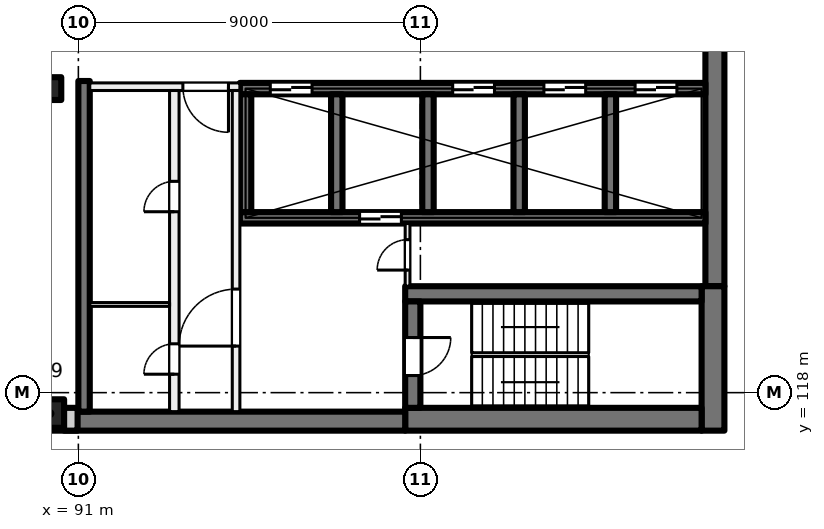
"""IFC4 building model, lengths in metres.
Left out: names, types, materials, properties, quantities, classifications, styles, units other than length and angle.
Written with IfcOpenShell. Run it as: python <this file> out.ifc"""

import sys

from ifc_helpers import new_model, si_unit, direction, frame, frame_2d, origin, origin_2d, place, context, subcontext, project, spatial, rectangle, extrude, element, fill, save


model = new_model("IFC4")
c1 = context("Model", 3, precision=1e-05, world=origin(), true_north=direction((0.0, 1.0)))
c2 = subcontext(c1, "Body", "Model", "MODEL_VIEW")
j1 = project(units=[si_unit("LENGTHUNIT", "METRE"), si_unit("PLANEANGLEUNIT", "RADIAN")], contexts=[c1])
p1 = place(None, origin())
s1 = spatial("IfcSite", under=j1, at=p1, CompositionType="ELEMENT")
p2 = place(p1, origin())
s2 = spatial("IfcBuilding", under=s1, at=p2, CompositionType="ELEMENT")
p3 = place(p2, frame((0.0, 0.0, 192.0)))
s3 = spatial("IfcBuildingStorey", under=s2, at=p3, CompositionType="ELEMENT", Elevation=192.0)
p4 = place(p3, frame((90.25, 126.0, 0.0), z_axis=(0.0, 0.0, 1.0), x_axis=(1.0, 0.0, 0.0)))
e1 = element("IfcColumn", 1, at=p4, inside=s3, PredefinedType="COLUMN", context=c2, shape_type="SweptSolid", body=[
    extrude(rectangle(XDim=0.6, YDim=0.6, at=origin_2d()), origin(), (0.0, 0.0, 1.0), 4.0),
])
p5 = place(p3, frame((90.25, 117.45, 0.0), z_axis=(0.0, 0.0, 1.0), x_axis=(1.0, 0.0, 0.0)))
e2 = element("IfcColumn", 2, at=p5, inside=s3, PredefinedType="COLUMN", context=c2, shape_type="SweptSolid", body=[
    extrude(rectangle(XDim=0.75, YDim=0.75, at=origin_2d()), origin(), (0.0, 0.0, 1.0), 4.0),
])
p6 = place(p3, frame((107.75, 135.2, 0.0), z_axis=(0.0, 0.0, 1.0), x_axis=(0.0, -1.0, 0.0)))
e3 = element("IfcWall", 3, at=p6, inside=s3, PredefinedType="SHEAR", context=c2, shape_type="SweptSolid", body=[
    extrude(rectangle(XDim=14.4, YDim=0.5, at=frame_2d((7.2, 0.0))), origin(), (0.0, 0.0, 1.0), 4.0),
])
p7 = place(p3, frame((107.7, 120.8, 0.0), z_axis=(0.0, 0.0, 1.0), x_axis=(0.0, -1.0, 0.0)))
e4 = element("IfcWall", 4, at=p7, inside=s3, PredefinedType="SHEAR", context=c2, shape_type="SweptSolid", body=[
    extrude(rectangle(XDim=3.8, YDim=0.6, at=frame_2d((1.9, 0.0))), origin(), (0.0, 0.0, 1.0), 4.0),
])
p8 = place(p3, frame((107.4, 117.3, 0.0), z_axis=(0.0, 0.0, 1.0), x_axis=(-1.0, 0.0, 0.0)))
e5 = element("IfcWall", 5, at=p8, inside=s3, PredefinedType="SHEAR", context=c2, shape_type="SweptSolid", body=[
    extrude(rectangle(XDim=7.8, YDim=0.6, at=frame_2d((3.9, 0.0))), origin(), (0.0, 0.0, 1.0), 4.0),
])
p9 = place(p3, frame((99.6, 117.25, 0.0), z_axis=(0.0, 0.0, 1.0), x_axis=(-1.0, 0.0, 0.0)))
e6 = element("IfcWall", 6, at=p9, inside=s3, PredefinedType="SHEAR", context=c2, shape_type="SweptSolid", body=[
    extrude(rectangle(XDim=8.975, YDim=0.5, at=frame_2d((4.488, 0.0))), origin(), (0.0, 0.0, 1.0), 4.0),
])
p10 = place(p3, frame((107.4, 120.6, 0.0), z_axis=(0.0, 0.0, 1.0), x_axis=(-1.0, 0.0, 0.0)))
e7 = element("IfcWall", 7, at=p10, inside=s3, PredefinedType="SHEAR", context=c2, shape_type="SweptSolid", body=[
    extrude(rectangle(XDim=7.8, YDim=0.4, at=frame_2d((3.9, 0.0))), origin(), (0.0, 0.0, 1.0), 4.0),
])
p11 = place(p3, frame((99.8, 120.4, 0.0), z_axis=(0.0, 0.0, 1.0), x_axis=(0.0, -1.0, 0.0)))
e8 = element("IfcWall", 8, at=p11, inside=s3, PredefinedType="SHEAR", context=c2, shape_type="SweptSolid", body=[
    extrude(rectangle(XDim=2.8, YDim=0.4, at=frame_2d((1.4, 0.0))), origin(), (0.0, 0.0, 1.0), 4.0),
])
p12 = place(p11, frame((0.95, 0.0, 0.0)))
e9 = element("IfcOpeningElement", 9, at=p12, cuts=e8, PredefinedType="OPENING", context=c2, shape_type="SweptSolid", body=[
    extrude(rectangle(XDim=1.0, YDim=2.1, at=frame_2d((0.5, 1.05))), frame((0.0, 0.21, 0.0), z_axis=(0.0, -1.0, 0.0), x_axis=(1.0, 0.0, 0.0)), (0.0, 0.0, 1.0), 0.42),
])
p13 = place(p3, frame((107.5, 126.0, 0.0), z_axis=(0.0, 0.0, 1.0), x_axis=(-1.0, 0.0, 0.0)))
e10 = element("IfcWall", 10, at=p13, inside=s3, PredefinedType="SHEAR", context=c2, shape_type="SweptSolid", body=[
    extrude(rectangle(XDim=12.25, YDim=0.3, at=frame_2d((6.125, 0.0))), origin(), (0.0, 0.0, 1.0), 4.0),
])
p14 = place(p13, frame((0.75, 0.0, 0.0)))
e11 = element("IfcOpeningElement", 11, at=p14, cuts=e10, PredefinedType="OPENING", context=c2, shape_type="SweptSolid", body=[
    extrude(rectangle(XDim=1.1, YDim=2.1, at=frame_2d((0.55, 1.05))), frame((0.0, 0.16, 0.0), z_axis=(0.0, -1.0, 0.0), x_axis=(1.0, 0.0, 0.0)), (0.0, 0.0, 1.0), 0.32),
])
p15 = place(p13, frame((3.15, 0.0, 0.0)))
e12 = element("IfcOpeningElement", 12, at=p15, cuts=e10, PredefinedType="OPENING", context=c2, shape_type="SweptSolid", body=[
    extrude(rectangle(XDim=1.1, YDim=2.1, at=frame_2d((0.55, 1.05))), frame((0.0, 0.16, 0.0), z_axis=(0.0, -1.0, 0.0), x_axis=(1.0, 0.0, 0.0)), (0.0, 0.0, 1.0), 0.32),
])
p16 = place(p13, frame((5.55, 0.0, 0.0)))
e13 = element("IfcOpeningElement", 13, at=p16, cuts=e10, PredefinedType="OPENING", context=c2, shape_type="SweptSolid", body=[
    extrude(rectangle(XDim=1.1, YDim=2.1, at=frame_2d((0.55, 1.05))), frame((0.0, 0.16, 0.0), z_axis=(0.0, -1.0, 0.0), x_axis=(1.0, 0.0, 0.0)), (0.0, 0.0, 1.0), 0.32),
])
p17 = place(p13, frame((10.35, 0.0, 0.0)))
e14 = element("IfcOpeningElement", 14, at=p17, cuts=e10, PredefinedType="OPENING", context=c2, shape_type="SweptSolid", body=[
    extrude(rectangle(XDim=1.1, YDim=2.1, at=frame_2d((0.55, 1.05))), frame((0.0, 0.16, 0.0), z_axis=(0.0, -1.0, 0.0), x_axis=(1.0, 0.0, 0.0)), (0.0, 0.0, 1.0), 0.32),
])
p18 = place(p3, frame((107.5, 122.6, 0.0), z_axis=(0.0, 0.0, 1.0), x_axis=(-1.0, 0.0, 0.0)))
e15 = element("IfcWall", 15, at=p18, inside=s3, PredefinedType="SHEAR", context=c2, shape_type="SweptSolid", body=[
    extrude(rectangle(XDim=12.25, YDim=0.3, at=frame_2d((6.125, 0.0))), origin(), (0.0, 0.0, 1.0), 4.0),
])
p19 = place(p18, frame((8.0, 0.0, 0.0)))
e16 = element("IfcOpeningElement", 16, at=p19, cuts=e15, PredefinedType="OPENING", context=c2, shape_type="SweptSolid", body=[
    extrude(rectangle(XDim=1.1, YDim=2.1, at=frame_2d((0.55, 1.05))), frame((0.0, 0.16, 0.0), z_axis=(0.0, -1.0, 0.0), x_axis=(1.0, 0.0, 0.0)), (0.0, 0.0, 1.0), 0.32),
])
for number, where, z_axis, x_axis in (
    (17, (105.0, 125.85, 0.0), (0.0, 0.0, 1.0), (0.0, -1.0, 0.0)),
    (18, (102.6, 125.85, 0.0), (0.0, 0.0, 1.0), (0.0, -1.0, 0.0)),
    (19, (100.2, 125.85, 0.0), (0.0, 0.0, 1.0), (0.0, -1.0, 0.0)),
    (20, (97.8, 125.85, 0.0), (0.0, 0.0, 1.0), (0.0, -1.0, 0.0)),
    (21, (95.4, 125.85, 0.0), (0.0, 0.0, 1.0), (0.0, -1.0, 0.0)),
):
    element("IfcWall", number, at=place(p3, frame(where, z_axis=z_axis, x_axis=x_axis)), inside=s3, PredefinedType="SHEAR", context=c2, shape_type="SweptSolid", body=[
        extrude(rectangle(XDim=3.1, YDim=0.3, at=frame_2d((1.55, 0.0))), origin(), (0.0, 0.0, 1.0), 4.0),
    ])
p20 = place(p3, frame((91.15, 126.2, 0.0), z_axis=(0.0, 0.0, 1.0), x_axis=(0.0, -1.0, 0.0)))
e22 = element("IfcWall", 22, at=p20, inside=s3, PredefinedType="SHEAR", context=c2, shape_type="SweptSolid", body=[
    extrude(rectangle(XDim=8.7, YDim=0.3, at=frame_2d((4.35, 0.0))), origin(), (0.0, 0.0, 1.0), 4.0),
])
p21 = place(p3, frame((90.98, 117.3, 0.0), z_axis=(0.0, 0.0, 1.0), x_axis=(-1.0, 0.0, 0.0)))
e23 = element("IfcWall", 23, at=p21, inside=s3, PredefinedType="SOLIDWALL", context=c2, shape_type="SweptSolid", body=[
    extrude(rectangle(XDim=33.745, YDim=0.6, at=frame_2d((16.873, 0.0))), origin(), (0.0, 0.0, 1.0), 3.625),
])
p22 = place(p21, frame((1.48, 0.0, 0.9)))
e24 = element("IfcOpeningElement", 24, at=p22, cuts=e23, PredefinedType="OPENING", context=c2, shape_type="SweptSolid", body=[
    extrude(rectangle(XDim=3.0, YDim=2.4, at=frame_2d((1.5, 1.2))), frame((0.0, 0.31, 0.0), z_axis=(0.0, -1.0, 0.0), x_axis=(1.0, 0.0, 0.0)), (0.0, 0.0, 1.0), 0.62),
])
p23 = place(p21, frame((5.98, 0.0, 0.9)))
e25 = element("IfcOpeningElement", 25, at=p23, cuts=e23, PredefinedType="OPENING", context=c2, shape_type="SweptSolid", body=[
    extrude(rectangle(XDim=3.0, YDim=2.4, at=frame_2d((1.5, 1.2))), frame((0.0, 0.31, 0.0), z_axis=(0.0, -1.0, 0.0), x_axis=(1.0, 0.0, 0.0)), (0.0, 0.0, 1.0), 0.62),
])
p24 = place(p21, frame((10.48, 0.0, 0.9)))
e26 = element("IfcOpeningElement", 26, at=p24, cuts=e23, PredefinedType="OPENING", context=c2, shape_type="SweptSolid", body=[
    extrude(rectangle(XDim=3.0, YDim=2.4, at=frame_2d((1.5, 1.2))), frame((0.0, 0.31, 0.0), z_axis=(0.0, -1.0, 0.0), x_axis=(1.0, 0.0, 0.0)), (0.0, 0.0, 1.0), 0.62),
])
p25 = place(p21, frame((14.98, 0.0, 0.9)))
e27 = element("IfcOpeningElement", 27, at=p25, cuts=e23, PredefinedType="OPENING", context=c2, shape_type="SweptSolid", body=[
    extrude(rectangle(XDim=3.0, YDim=2.4, at=frame_2d((1.5, 1.2))), frame((0.0, 0.31, 0.0), z_axis=(0.0, -1.0, 0.0), x_axis=(1.0, 0.0, 0.0)), (0.0, 0.0, 1.0), 0.62),
])
p26 = place(p21, frame((19.48, 0.0, 0.9)))
e28 = element("IfcOpeningElement", 28, at=p26, cuts=e23, PredefinedType="OPENING", context=c2, shape_type="SweptSolid", body=[
    extrude(rectangle(XDim=3.0, YDim=2.4, at=frame_2d((1.5, 1.2))), frame((0.0, 0.31, 0.0), z_axis=(0.0, -1.0, 0.0), x_axis=(1.0, 0.0, 0.0)), (0.0, 0.0, 1.0), 0.62),
])
p27 = place(p21, frame((24.58, 0.0, 0.0)))
e29 = element("IfcOpeningElement", 29, at=p27, cuts=e23, PredefinedType="OPENING", context=c2, shape_type="SweptSolid", body=[
    extrude(rectangle(XDim=1.8, YDim=2.4, at=frame_2d((0.9, 1.2))), frame((0.0, 0.31, 0.0), z_axis=(0.0, -1.0, 0.0), x_axis=(1.0, 0.0, 0.0)), (0.0, 0.0, 1.0), 0.62),
])
p28 = place(p21, frame((28.48, 0.0, 0.9)))
e30 = element("IfcOpeningElement", 30, at=p28, cuts=e23, PredefinedType="OPENING", context=c2, shape_type="SweptSolid", body=[
    extrude(rectangle(XDim=3.0, YDim=2.4, at=frame_2d((1.5, 1.2))), frame((0.0, 0.31, 0.0), z_axis=(0.0, -1.0, 0.0), x_axis=(1.0, 0.0, 0.0)), (0.0, 0.0, 1.0), 0.62),
])
p29 = place(p3, frame((95.25, 126.05, 0.0), z_axis=(0.0, 0.0, 1.0), x_axis=(-1.0, 0.0, 0.0)))
e31 = element("IfcWall", 31, at=p29, inside=s3, PredefinedType="PARTITIONING", context=c2, shape_type="SweptSolid", body=[
    extrude(rectangle(XDim=3.95, YDim=0.2, at=frame_2d((1.975, 0.0))), origin(), (0.0, 0.0, 1.0), 3.625),
])
p30 = place(p29, frame((0.3, 0.0, 0.0)))
e32 = element("IfcOpeningElement", 32, at=p30, cuts=e31, PredefinedType="OPENING", context=c2, shape_type="SweptSolid", body=[
    extrude(rectangle(XDim=1.2, YDim=2.1, at=frame_2d((0.6, 1.05))), frame((0.0, 0.11, 0.0), z_axis=(0.0, -1.0, 0.0), x_axis=(1.0, 0.0, 0.0)), (0.0, 0.0, 1.0), 0.22),
])
p31 = place(p3, frame((95.15, 117.5, 0.0), z_axis=(0.0, 0.0, 1.0), x_axis=(0.0, 1.0, 0.0)))
e33 = element("IfcWall", 33, at=p31, inside=s3, PredefinedType="PARTITIONING", context=c2, shape_type="SweptSolid", body=[
    extrude(rectangle(XDim=8.45, YDim=0.2, at=frame_2d((4.225, 0.0))), origin(), (0.0, 0.0, 1.0), 3.625),
])
p32 = place(p31, frame((1.725, 0.0, 0.0)))
e34 = element("IfcOpeningElement", 34, at=p32, cuts=e33, PredefinedType="OPENING", context=c2, shape_type="SweptSolid", body=[
    extrude(rectangle(XDim=1.5, YDim=2.1, at=frame_2d((0.75, 1.05))), frame((0.0, 0.11, 0.0), z_axis=(0.0, -1.0, 0.0), x_axis=(1.0, 0.0, 0.0)), (0.0, 0.0, 1.0), 0.22),
])
p33 = place(p3, frame((93.525, 117.5, 0.0), z_axis=(0.0, 0.0, 1.0), x_axis=(0.0, 1.0, 0.0)))
e35 = element("IfcWall", 35, at=p33, inside=s3, PredefinedType="PARTITIONING", context=c2, shape_type="SweptSolid", body=[
    extrude(rectangle(XDim=8.45, YDim=0.25, at=frame_2d((4.225, 0.0))), origin(), (0.0, 0.0, 1.0), 3.625),
])
p34 = place(p33, frame((5.26, 0.0, 0.0)))
e36 = element("IfcOpeningElement", 36, at=p34, cuts=e35, PredefinedType="OPENING", context=c2, shape_type="SweptSolid", body=[
    extrude(rectangle(XDim=0.8, YDim=2.1, at=frame_2d((0.4, 1.05))), frame((0.0, 0.135, 0.0), z_axis=(0.0, -1.0, 0.0), x_axis=(1.0, 0.0, 0.0)), (0.0, 0.0, 1.0), 0.27),
])
p35 = place(p33, frame((0.985, 0.0, 0.0)))
e37 = element("IfcOpeningElement", 37, at=p35, cuts=e35, PredefinedType="OPENING", context=c2, shape_type="SweptSolid", body=[
    extrude(rectangle(XDim=0.8, YDim=2.1, at=frame_2d((0.4, 1.05))), frame((0.0, 0.135, 0.0), z_axis=(0.0, -1.0, 0.0), x_axis=(1.0, 0.0, 0.0)), (0.0, 0.0, 1.0), 0.27),
])
p36 = place(p3, frame((99.663, 120.8, 0.0), z_axis=(0.0, 0.0, 1.0), x_axis=(0.0, 1.0, 0.0)))
e38 = element("IfcWall", 38, at=p36, inside=s3, PredefinedType="PARTITIONING", context=c2, shape_type="SweptSolid", body=[
    extrude(rectangle(XDim=1.65, YDim=0.125, at=frame_2d((0.825, 0.0))), origin(), (0.0, 0.0, 1.0), 3.625),
])
p37 = place(p36, frame((0.425, 0.0, 0.0)))
e39 = element("IfcOpeningElement", 39, at=p37, cuts=e38, PredefinedType="OPENING", context=c2, shape_type="SweptSolid", body=[
    extrude(rectangle(XDim=0.8, YDim=2.1, at=frame_2d((0.4, 1.05))), frame((0.0, 0.073, 0.0), z_axis=(0.0, -1.0, 0.0), x_axis=(1.0, 0.0, 0.0)), (0.0, 0.0, 1.0), 0.145),
])
p38 = place(p3, frame((93.4, 120.32, 0.0), z_axis=(0.0, 0.0, 1.0), x_axis=(-1.0, 0.0, 0.0)))
e40 = element("IfcWall", 40, at=p38, inside=s3, PredefinedType="PARTITIONING", context=c2, shape_type="SweptSolid", body=[
    extrude(rectangle(XDim=2.1, YDim=0.1, at=frame_2d((1.05, 0.0))), origin(), (0.0, 0.0, 1.0), 3.625),
])
p39 = place(p14, origin())
e41 = element("IfcDoor", 41, at=p39, inside=s3, OperationType="DOUBLE_DOOR_SLIDING", PredefinedType="DOOR", context=c2, shape_type="SweptSolid", body=[
    extrude(rectangle(XDim=1.1, YDim=2.1, at=frame_2d((0.55, 1.05))), frame((0.0, 0.025, 0.0), z_axis=(0.0, -1.0, 0.0), x_axis=(1.0, 0.0, 0.0)), (0.0, 0.0, 1.0), 0.05),
])
fill(e11, e41)
p40 = place(p15, origin())
e42 = element("IfcDoor", 42, at=p40, inside=s3, OperationType="DOUBLE_DOOR_SLIDING", PredefinedType="DOOR", context=c2, shape_type="SweptSolid", body=[
    extrude(rectangle(XDim=1.1, YDim=2.1, at=frame_2d((0.55, 1.05))), frame((0.0, 0.025, 0.0), z_axis=(0.0, -1.0, 0.0), x_axis=(1.0, 0.0, 0.0)), (0.0, 0.0, 1.0), 0.05),
])
fill(e12, e42)
p41 = place(p16, origin())
e43 = element("IfcDoor", 43, at=p41, inside=s3, OperationType="DOUBLE_DOOR_SLIDING", PredefinedType="DOOR", context=c2, shape_type="SweptSolid", body=[
    extrude(rectangle(XDim=1.1, YDim=2.1, at=frame_2d((0.55, 1.05))), frame((0.0, 0.025, 0.0), z_axis=(0.0, -1.0, 0.0), x_axis=(1.0, 0.0, 0.0)), (0.0, 0.0, 1.0), 0.05),
])
fill(e13, e43)
p42 = place(p17, origin())
e44 = element("IfcDoor", 44, at=p42, inside=s3, OperationType="DOUBLE_DOOR_SLIDING", PredefinedType="DOOR", context=c2, shape_type="SweptSolid", body=[
    extrude(rectangle(XDim=1.1, YDim=2.1, at=frame_2d((0.55, 1.05))), frame((0.0, 0.025, 0.0), z_axis=(0.0, -1.0, 0.0), x_axis=(1.0, 0.0, 0.0)), (0.0, 0.0, 1.0), 0.05),
])
fill(e14, e44)
p43 = place(p30, origin())
e45 = element("IfcDoor", 45, at=p43, inside=s3, OperationType="DOUBLE_DOOR_SINGLE_SWING", PredefinedType="DOOR", context=c2, shape_type="SweptSolid", body=[
    extrude(rectangle(XDim=1.2, YDim=2.1, at=frame_2d((0.6, 1.05))), frame((0.0, 0.025, 0.0), z_axis=(0.0, -1.0, 0.0), x_axis=(1.0, 0.0, 0.0)), (0.0, 0.0, 1.0), 0.05),
])
fill(e32, e45)
p44 = place(p32, origin())
e46 = element("IfcDoor", 46, at=p44, inside=s3, OperationType="DOUBLE_DOOR_SINGLE_SWING", PredefinedType="DOOR", context=c2, shape_type="SweptSolid", body=[
    extrude(rectangle(XDim=1.5, YDim=2.1, at=frame_2d((0.75, 1.05))), frame((0.0, 0.025, 0.0), z_axis=(0.0, -1.0, 0.0), x_axis=(1.0, 0.0, 0.0)), (0.0, 0.0, 1.0), 0.05),
])
fill(e34, e46)
p45 = place(p12, origin())
e47 = element("IfcDoor", 47, at=p45, inside=s3, OperationType="SINGLE_SWING_LEFT", PredefinedType="DOOR", context=c2, shape_type="SweptSolid", body=[
    extrude(rectangle(XDim=1.0, YDim=2.1, at=frame_2d((0.5, 1.05))), frame((0.0, 0.025, 0.0), z_axis=(0.0, -1.0, 0.0), x_axis=(1.0, 0.0, 0.0)), (0.0, 0.0, 1.0), 0.05),
])
fill(e9, e47)
p46 = place(p37, origin())
e48 = element("IfcDoor", 48, at=p46, inside=s3, OperationType="SINGLE_SWING_RIGHT", PredefinedType="DOOR", context=c2, shape_type="SweptSolid", body=[
    extrude(rectangle(XDim=0.8, YDim=2.1, at=frame_2d((0.4, 1.05))), frame((0.0, 0.025, 0.0), z_axis=(0.0, -1.0, 0.0), x_axis=(1.0, 0.0, 0.0)), (0.0, 0.0, 1.0), 0.05),
])
fill(e39, e48)
p47 = place(p34, origin())
e49 = element("IfcDoor", 49, at=p47, inside=s3, OperationType="SINGLE_SWING_LEFT", PredefinedType="DOOR", context=c2, shape_type="SweptSolid", body=[
    extrude(rectangle(XDim=0.8, YDim=2.1, at=frame_2d((0.4, 1.05))), frame((0.0, 0.025, 0.0), z_axis=(0.0, -1.0, 0.0), x_axis=(1.0, 0.0, 0.0)), (0.0, 0.0, 1.0), 0.05),
])
fill(e36, e49)
p48 = place(p35, origin())
e50 = element("IfcDoor", 50, at=p48, inside=s3, OperationType="SINGLE_SWING_RIGHT", PredefinedType="DOOR", context=c2, shape_type="SweptSolid", body=[
    extrude(rectangle(XDim=0.8, YDim=2.1, at=frame_2d((0.4, 1.05))), frame((0.0, 0.025, 0.0), z_axis=(0.0, -1.0, 0.0), x_axis=(1.0, 0.0, 0.0)), (0.0, 0.0, 1.0), 0.05),
])
fill(e37, e50)
p49 = place(p19, origin())
e51 = element("IfcDoor", 51, at=p49, inside=s3, OperationType="DOUBLE_DOOR_SLIDING", PredefinedType="DOOR", context=c2, shape_type="SweptSolid", body=[
    extrude(rectangle(XDim=1.1, YDim=2.1, at=frame_2d((0.55, 1.05))), frame((0.0, 0.025, 0.0), z_axis=(0.0, -1.0, 0.0), x_axis=(1.0, 0.0, 0.0)), (0.0, 0.0, 1.0), 0.05),
])
fill(e16, e51)
save(model, sys.argv[1])
